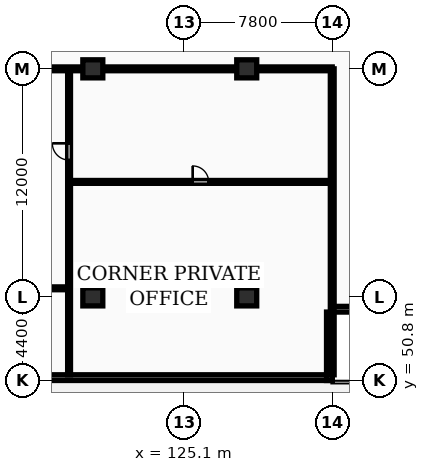
"""IFC4 building model, lengths in metres.
Left out: names, types, materials, properties, quantities, classifications, styles, units other than length and angle.
Written with IfcOpenShell. Run it as: python <this file> out.ifc"""

import sys

from ifc_helpers import new_model, si_unit, direction, frame, frame_2d, origin, origin_2d, place, context, subcontext, project, spatial, rectangle, extrude, element, fill, save


model = new_model("IFC4")
c1 = context("Model", 3, precision=1e-05, world=origin(), true_north=direction((0.0, 1.0)))
c2 = subcontext(c1, "Body", "Model", "MODEL_VIEW")
j1 = project(units=[si_unit("LENGTHUNIT", "METRE"), si_unit("PLANEANGLEUNIT", "RADIAN")], contexts=[c1])
p1 = place(None, origin())
s1 = spatial("IfcSite", under=j1, at=p1, CompositionType="ELEMENT")
p2 = place(p1, origin())
s2 = spatial("IfcBuilding", under=s1, at=p2, CompositionType="ELEMENT")
p3 = place(p2, frame((0.0, 0.0, 24.0)))
s3 = spatial("IfcBuildingStorey", under=s2, at=p3, CompositionType="ELEMENT", Elevation=24.0)
for number, where, z_axis, x_axis in (
    (1, (120.3, 55.2, 0.0), (0.0, 0.0, 1.0), (1.0, 0.0, 0.0)),
    (2, (120.3, 67.2, 0.0), (0.0, 0.0, 1.0), (1.0, 0.0, 0.0)),
    (3, (128.4, 55.2, 0.0), (0.0, 0.0, 1.0), (1.0, 0.0, 0.0)),
    (4, (128.4, 67.2, 0.0), (0.0, 0.0, 1.0), (1.0, 0.0, 0.0)),
):
    element("IfcColumn", number, at=place(p3, frame(where, z_axis=z_axis, x_axis=x_axis)), inside=s3, PredefinedType="COLUMN", context=c2, shape_type="SweptSolid", body=[
        extrude(rectangle(XDim=1.05, YDim=0.95, at=origin_2d()), origin(), (0.0, 0.0, 1.0), 3.25),
    ])
p4 = place(p3, frame((55.3, 50.95, 0.0), z_axis=(0.0, 0.0, 1.0), x_axis=(1.0, 0.0, 0.0)))
e5 = element("IfcWall", 5, at=p4, inside=s3, PredefinedType="STANDARD", context=c2, shape_type="SweptSolid", body=[
    extrude(rectangle(XDim=77.6, YDim=0.3, at=frame_2d((38.8, 0.0))), origin(), (0.0, 0.0, 1.0), 2.97),
])
p5 = place(p4, frame((17.525, 0.0, 0.85)))
e6 = element("IfcOpeningElement", 6, at=p5, cuts=e5, PredefinedType="OPENING", context=c2, shape_type="SweptSolid", body=[
    extrude(rectangle(XDim=1.8, YDim=1.8, at=frame_2d((0.9, 0.9))), frame((0.0, 0.16, 0.0), z_axis=(0.0, -1.0, 0.0), x_axis=(1.0, 0.0, 0.0)), (0.0, 0.0, 1.0), 0.32),
])
p6 = place(p4, frame((60.875, 0.0, 0.85)))
e7 = element("IfcOpeningElement", 7, at=p6, cuts=e5, PredefinedType="OPENING", context=c2, shape_type="SweptSolid", body=[
    extrude(rectangle(XDim=1.8, YDim=1.8, at=frame_2d((0.9, 0.9))), frame((0.0, 0.16, 0.0), z_axis=(0.0, -1.0, 0.0), x_axis=(1.0, 0.0, 0.0)), (0.0, 0.0, 1.0), 0.32),
])
p7 = place(p4, frame((9.9, 0.0, 0.0)))
e8 = element("IfcOpeningElement", 8, at=p7, cuts=e5, PredefinedType="OPENING", context=c2, shape_type="SweptSolid", body=[
    extrude(rectangle(XDim=1.6, YDim=2.2, at=frame_2d((0.8, 1.1))), frame((0.0, 0.16, 0.0), z_axis=(0.0, -1.0, 0.0), x_axis=(1.0, 0.0, 0.0)), (0.0, 0.0, 1.0), 0.32),
])
p8 = place(p3, frame((132.75, 50.8, 0.0), z_axis=(0.0, 0.0, 1.0), x_axis=(0.0, 1.0, 0.0)))
e9 = element("IfcWall", 9, at=p8, inside=s3, PredefinedType="STANDARD", context=c2, shape_type="SweptSolid", body=[
    extrude(rectangle(XDim=3.6, YDim=0.3, at=frame_2d((1.8, 0.0))), origin(), (0.0, 0.0, 1.0), 2.97),
])
p9 = place(p3, frame((132.9, 54.55, 0.0), z_axis=(0.0, 0.0, 1.0), x_axis=(1.0, 0.0, 0.0)))
e10 = element("IfcWall", 10, at=p9, inside=s3, PredefinedType="STANDARD", context=c2, shape_type="SweptSolid", body=[
    extrude(rectangle(XDim=3.6, YDim=0.3, at=frame_2d((1.8, 0.0))), origin(), (0.0, 0.0, 1.0), 2.97),
])
p10 = place(p3, frame((132.9, 51.1, 0.0), z_axis=(0.0, 0.0, 1.0), x_axis=(0.0, 1.0, 0.0)))
e11 = element("IfcWall", 11, at=p10, inside=s3, PredefinedType="PARTITIONING", context=c2, shape_type="SweptSolid", body=[
    extrude(rectangle(XDim=16.1, YDim=0.2, at=frame_2d((8.05, 0.0))), origin(), (0.0, 0.0, 1.0), 2.97),
])
p11 = place(p3, frame((119.05, 61.25, 0.0), z_axis=(0.0, 0.0, 1.0), x_axis=(1.0, 0.0, 0.0)))
e12 = element("IfcWall", 12, at=p11, inside=s3, PredefinedType="PARTITIONING", context=c2, shape_type="SweptSolid", body=[
    extrude(rectangle(XDim=13.85, YDim=0.15, at=frame_2d((6.925, 0.0))), origin(), (0.0, 0.0, 1.0), 2.97),
])
p12 = place(p11, frame((6.505, 0.0, 0.0)))
e13 = element("IfcOpeningElement", 13, at=p12, cuts=e12, PredefinedType="OPENING", context=c2, shape_type="SweptSolid", body=[
    extrude(rectangle(XDim=0.84, YDim=2.04, at=frame_2d((0.42, 1.02))), frame((0.0, 0.085, 0.0), z_axis=(0.0, -1.0, 0.0), x_axis=(1.0, 0.0, 0.0)), (0.0, 0.0, 1.0), 0.17),
])
p13 = place(p3, frame((119.05, 51.1, 0.0), z_axis=(0.0, 0.0, 1.0), x_axis=(0.0, 1.0, 0.0)))
e14 = element("IfcWall", 14, at=p13, inside=s3, PredefinedType="PARTITIONING", context=c2, shape_type="SweptSolid", body=[
    extrude(rectangle(XDim=16.05, YDim=0.15, at=frame_2d((8.025, 0.0))), origin(), (0.0, 0.0, 1.0), 2.97),
])
p14 = place(p13, frame((11.3, 0.0, 0.0)))
e15 = element("IfcOpeningElement", 15, at=p14, cuts=e14, PredefinedType="OPENING", context=c2, shape_type="SweptSolid", body=[
    extrude(rectangle(XDim=0.88, YDim=2.06, at=frame_2d((0.44, 1.03))), frame((0.0, 0.085, 0.0), z_axis=(0.0, -1.0, 0.0), x_axis=(1.0, 0.0, 0.0)), (0.0, 0.0, 1.0), 0.17),
])
p15 = place(p3, frame((112.27, 55.65, 0.0), z_axis=(0.0, 0.0, 1.0), x_axis=(1.0, 0.0, 0.0)))
e16 = element("IfcWall", 16, at=p15, inside=s3, PredefinedType="PARTITIONING", context=c2, shape_type="SweptSolid", body=[
    extrude(rectangle(XDim=6.76, YDim=0.15, at=frame_2d((3.38, 0.0))), origin(), (0.0, 0.0, 1.0), 2.97),
])
p16 = place(p15, frame((1.64, 0.0, 0.0)))
e17 = element("IfcOpeningElement", 17, at=p16, cuts=e16, PredefinedType="OPENING", context=c2, shape_type="SweptSolid", body=[
    extrude(rectangle(XDim=0.84, YDim=2.04, at=frame_2d((0.42, 1.02))), frame((0.0, 0.085, 0.0), z_axis=(0.0, -1.0, 0.0), x_axis=(1.0, 0.0, 0.0)), (0.0, 0.0, 1.0), 0.17),
])
p17 = place(p15, frame((3.16, 0.0, 0.0)))
e18 = element("IfcOpeningElement", 18, at=p17, cuts=e16, PredefinedType="OPENING", context=c2, shape_type="SweptSolid", body=[
    extrude(rectangle(XDim=0.88, YDim=2.06, at=frame_2d((0.44, 1.03))), frame((0.0, 0.085, 0.0), z_axis=(0.0, -1.0, 0.0), x_axis=(1.0, 0.0, 0.0)), (0.0, 0.0, 1.0), 0.17),
])
p18 = place(p3, frame((112.25, 67.2, 0.0), z_axis=(0.0, 0.0, 1.0), x_axis=(1.0, 0.0, 0.0)))
e19 = element("IfcWall", 19, at=p18, inside=s3, PredefinedType="PARTITIONING", context=c2, shape_type="SweptSolid", body=[
    extrude(rectangle(XDim=20.65, YDim=0.2, at=frame_2d((10.325, 0.0))), origin(), (0.0, 0.0, 1.0), 2.37),
])
p19 = place(p18, frame((1.58, 0.0, 0.0)))
e20 = element("IfcOpeningElement", 20, at=p19, cuts=e19, PredefinedType="OPENING", context=c2, shape_type="SweptSolid", body=[
    extrude(rectangle(XDim=0.95, YDim=2.15, at=frame_2d((0.475, 1.075))), frame((0.0, 0.11, 0.0), z_axis=(0.0, -1.0, 0.0), x_axis=(1.0, 0.0, 0.0)), (0.0, 0.0, 1.0), 0.22),
])
p20 = place(p12, origin())
e21 = element("IfcDoor", 21, at=p20, inside=s3, OperationType="SINGLE_SWING_LEFT", PredefinedType="DOOR", context=c2, shape_type="SweptSolid", body=[
    extrude(rectangle(XDim=0.84, YDim=2.04, at=frame_2d((0.42, 1.02))), frame((0.0, 0.025, 0.0), z_axis=(0.0, -1.0, 0.0), x_axis=(1.0, 0.0, 0.0)), (0.0, 0.0, 1.0), 0.05),
])
fill(e13, e21)
p21 = place(p14, origin())
e22 = element("IfcDoor", 22, at=p21, inside=s3, OperationType="SINGLE_SWING_RIGHT", PredefinedType="DOOR", context=c2, shape_type="SweptSolid", body=[
    extrude(rectangle(XDim=0.88, YDim=2.06, at=frame_2d((0.44, 1.03))), frame((0.0, 0.025, 0.0), z_axis=(0.0, -1.0, 0.0), x_axis=(1.0, 0.0, 0.0)), (0.0, 0.0, 1.0), 0.05),
])
fill(e15, e22)
save(model, sys.argv[1])
